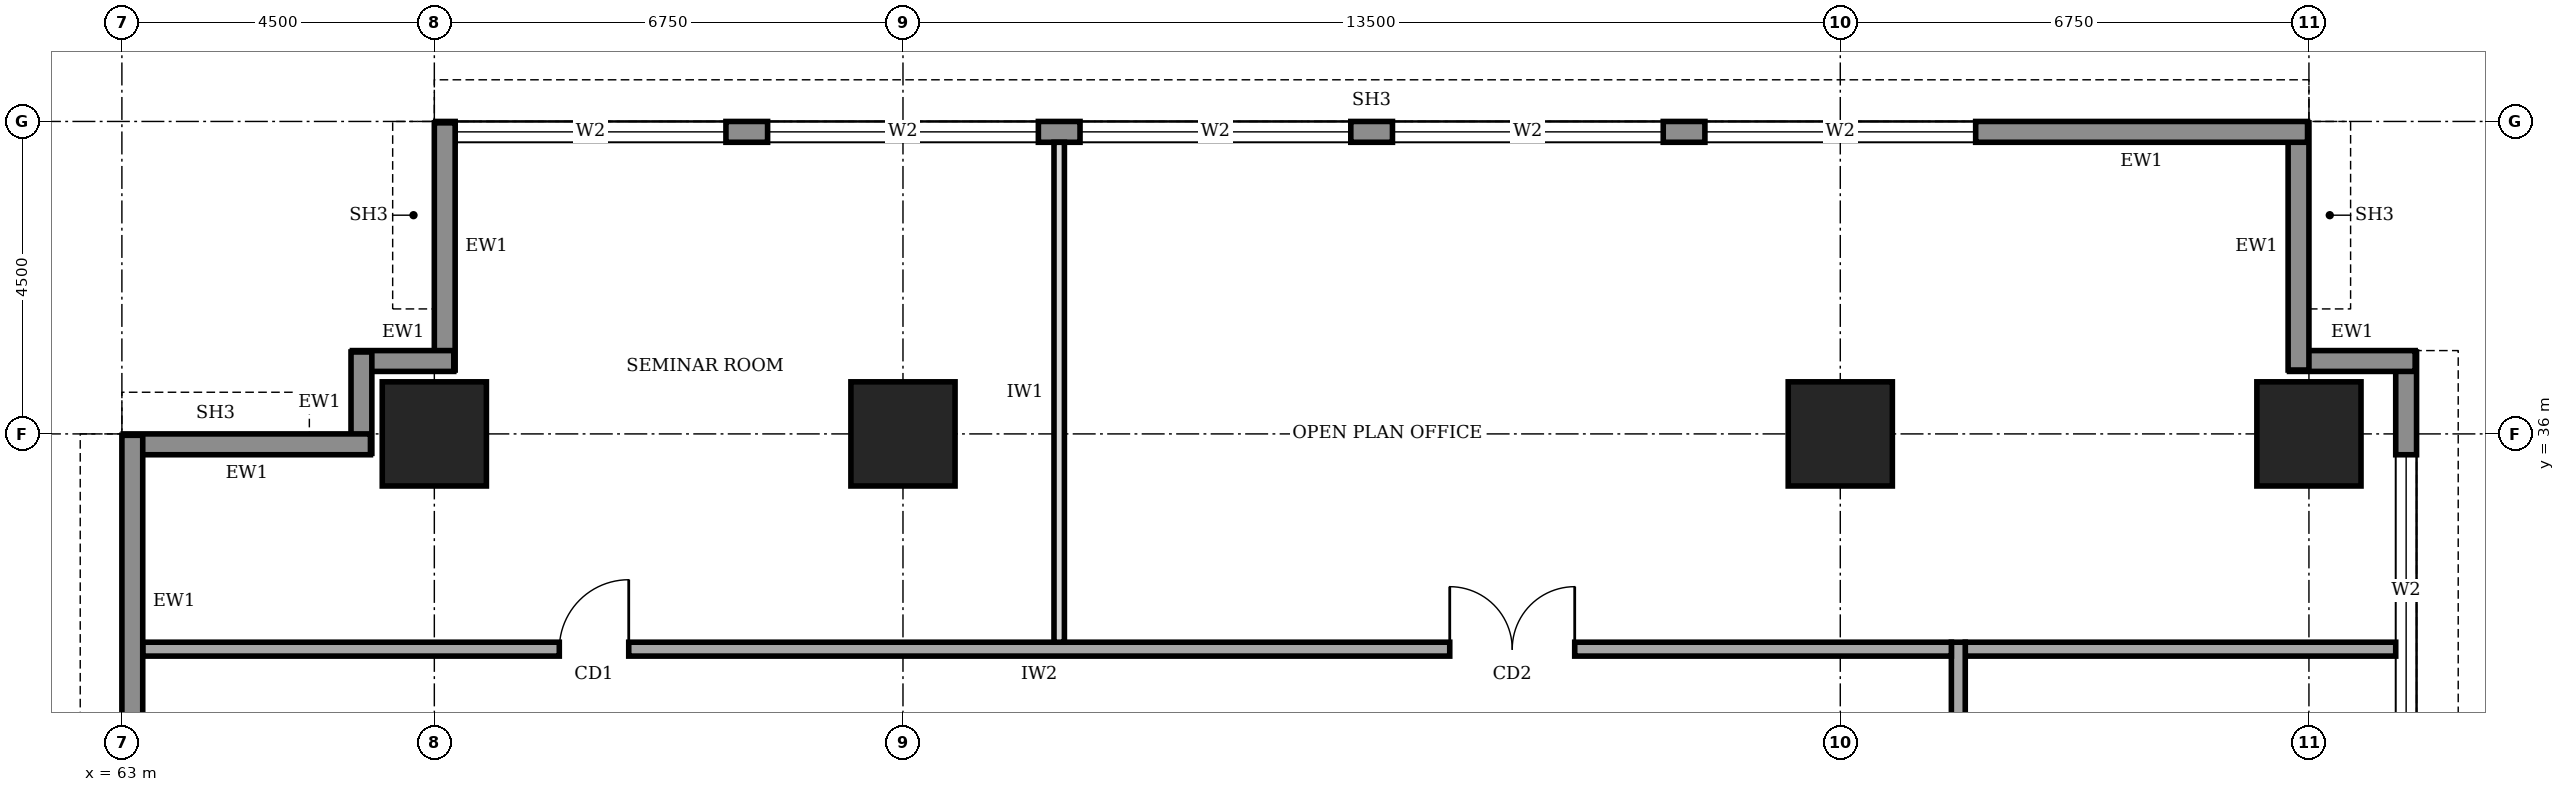
"""IFC4 building model, lengths in metres.
Left out: names, types, materials, properties, quantities, classifications, styles, units other than length and angle.
Written with IfcOpenShell. Run it as: python <this file> out.ifc"""

import sys

from ifc_helpers import new_model, si_unit, direction, frame, frame_2d, origin, origin_2d, place, context, subcontext, project, spatial, rectangle, extrude, element, fill, save


model = new_model("IFC4")
c1 = context("Model", 3, precision=1e-05, world=origin(), true_north=direction((0.0, 1.0)))
c2 = subcontext(c1, "Body", "Model", "MODEL_VIEW")
j1 = project(units=[si_unit("LENGTHUNIT", "METRE"), si_unit("PLANEANGLEUNIT", "RADIAN")], contexts=[c1])
p1 = place(None, origin())
s1 = spatial("IfcSite", under=j1, at=p1, CompositionType="ELEMENT")
p2 = place(p1, origin())
s2 = spatial("IfcBuilding", under=s1, at=p2, CompositionType="ELEMENT")
p3 = place(p2, frame((0.0, 0.0, 145.0)))
s3 = spatial("IfcBuildingStorey", under=s2, at=p3, CompositionType="ELEMENT", Elevation=145.0)
for number, where, z_axis, x_axis in (
    (1, (67.5, 36.0, 0.0), (0.0, 0.0, 1.0), (1.0, 0.0, 0.0)),
    (2, (74.25, 36.0, 0.0), (0.0, 0.0, 1.0), (1.0, 0.0, 0.0)),
    (3, (87.75, 36.0, 0.0), (0.0, 0.0, 1.0), (1.0, 0.0, 0.0)),
    (4, (94.5, 36.0, 0.0), (0.0, 0.0, 1.0), (1.0, 0.0, 0.0)),
):
    element("IfcColumn", number, at=place(p3, frame(where, z_axis=z_axis, x_axis=x_axis)), inside=s3, PredefinedType="COLUMN", context=c2, shape_type="SweptSolid", body=[
        extrude(rectangle(XDim=1.5, YDim=1.5, at=origin_2d()), origin(), (0.0, 0.0, 1.0), 4.0),
    ])
p4 = place(p3, frame((95.9, 3.32, 0.0), z_axis=(0.0, 0.0, 1.0), x_axis=(0.0, 1.0, 0.0)))
e5 = element("IfcWall", 5, at=p4, inside=s3, PredefinedType="STANDARD", context=c2, shape_type="SweptSolid", body=[
    extrude(rectangle(XDim=33.86, YDim=0.3, at=frame_2d((16.93, 0.0))), origin(), (0.0, 0.0, 1.0), 3.75),
])
p5 = place(p4, frame((1.48, 0.0, 0.6)))
e6 = element("IfcOpeningElement", 6, at=p5, cuts=e5, PredefinedType="OPENING", context=c2, shape_type="SweptSolid", body=[
    extrude(rectangle(XDim=3.9, YDim=2.6, at=frame_2d((1.95, 1.3))), frame((0.0, 0.16, 0.0), z_axis=(0.0, -1.0, 0.0), x_axis=(1.0, 0.0, 0.0)), (0.0, 0.0, 1.0), 0.32),
])
p6 = place(p4, frame((5.98, 0.0, 0.6)))
e7 = element("IfcOpeningElement", 7, at=p6, cuts=e5, PredefinedType="OPENING", context=c2, shape_type="SweptSolid", body=[
    extrude(rectangle(XDim=3.9, YDim=2.6, at=frame_2d((1.95, 1.3))), frame((0.0, 0.16, 0.0), z_axis=(0.0, -1.0, 0.0), x_axis=(1.0, 0.0, 0.0)), (0.0, 0.0, 1.0), 0.32),
])
p7 = place(p4, frame((10.48, 0.0, 0.6)))
e8 = element("IfcOpeningElement", 8, at=p7, cuts=e5, PredefinedType="OPENING", context=c2, shape_type="SweptSolid", body=[
    extrude(rectangle(XDim=3.9, YDim=2.6, at=frame_2d((1.95, 1.3))), frame((0.0, 0.16, 0.0), z_axis=(0.0, -1.0, 0.0), x_axis=(1.0, 0.0, 0.0)), (0.0, 0.0, 1.0), 0.32),
])
p8 = place(p4, frame((14.98, 0.0, 0.6)))
e9 = element("IfcOpeningElement", 9, at=p8, cuts=e5, PredefinedType="OPENING", context=c2, shape_type="SweptSolid", body=[
    extrude(rectangle(XDim=3.9, YDim=2.6, at=frame_2d((1.95, 1.3))), frame((0.0, 0.16, 0.0), z_axis=(0.0, -1.0, 0.0), x_axis=(1.0, 0.0, 0.0)), (0.0, 0.0, 1.0), 0.32),
])
p9 = place(p4, frame((19.48, 0.0, 0.6)))
e10 = element("IfcOpeningElement", 10, at=p9, cuts=e5, PredefinedType="OPENING", context=c2, shape_type="SweptSolid", body=[
    extrude(rectangle(XDim=3.9, YDim=2.6, at=frame_2d((1.95, 1.3))), frame((0.0, 0.16, 0.0), z_axis=(0.0, -1.0, 0.0), x_axis=(1.0, 0.0, 0.0)), (0.0, 0.0, 1.0), 0.32),
])
p10 = place(p4, frame((23.98, 0.0, 0.6)))
e11 = element("IfcOpeningElement", 11, at=p10, cuts=e5, PredefinedType="OPENING", context=c2, shape_type="SweptSolid", body=[
    extrude(rectangle(XDim=3.9, YDim=2.6, at=frame_2d((1.95, 1.3))), frame((0.0, 0.16, 0.0), z_axis=(0.0, -1.0, 0.0), x_axis=(1.0, 0.0, 0.0)), (0.0, 0.0, 1.0), 0.32),
])
p11 = place(p4, frame((28.48, 0.0, 0.6)))
e12 = element("IfcOpeningElement", 12, at=p11, cuts=e5, PredefinedType="OPENING", context=c2, shape_type="SweptSolid", body=[
    extrude(rectangle(XDim=3.9, YDim=2.6, at=frame_2d((1.95, 1.3))), frame((0.0, 0.16, 0.0), z_axis=(0.0, -1.0, 0.0), x_axis=(1.0, 0.0, 0.0)), (0.0, 0.0, 1.0), 0.32),
])
p12 = place(p3, frame((96.03, 37.05, 0.0), z_axis=(0.0, 0.0, 1.0), x_axis=(-1.0, 0.0, 0.0)))
e13 = element("IfcWall", 13, at=p12, inside=s3, PredefinedType="STANDARD", context=c2, shape_type="SweptSolid", body=[
    extrude(rectangle(XDim=1.81, YDim=0.3, at=frame_2d((0.905, 0.0))), origin(), (0.0, 0.0, 1.0), 3.75),
])
p13 = place(p3, frame((94.35, 36.92, 0.0), z_axis=(0.0, 0.0, 1.0), x_axis=(0.0, 1.0, 0.0)))
e14 = element("IfcWall", 14, at=p13, inside=s3, PredefinedType="STANDARD", context=c2, shape_type="SweptSolid", body=[
    extrude(rectangle(XDim=3.56, YDim=0.3, at=frame_2d((1.78, 0.0))), origin(), (0.0, 0.0, 1.0), 2.85),
])
p14 = place(p3, frame((94.48, 40.35, 0.0), z_axis=(0.0, 0.0, 1.0), x_axis=(-1.0, 0.0, 0.0)))
e15 = element("IfcWall", 15, at=p14, inside=s3, PredefinedType="STANDARD", context=c2, shape_type="SweptSolid", body=[
    extrude(rectangle(XDim=26.96, YDim=0.3, at=frame_2d((13.48, 0.0))), origin(), (0.0, 0.0, 1.0), 3.75),
])
p15 = place(p14, frame((22.78, 0.0, 0.6)))
e16 = element("IfcOpeningElement", 16, at=p15, cuts=e15, PredefinedType="OPENING", context=c2, shape_type="SweptSolid", body=[
    extrude(rectangle(XDim=3.9, YDim=2.6, at=frame_2d((1.95, 1.3))), frame((0.0, 0.16, 0.0), z_axis=(0.0, -1.0, 0.0), x_axis=(1.0, 0.0, 0.0)), (0.0, 0.0, 1.0), 0.32),
])
p16 = place(p14, frame((18.28, 0.0, 0.6)))
e17 = element("IfcOpeningElement", 17, at=p16, cuts=e15, PredefinedType="OPENING", context=c2, shape_type="SweptSolid", body=[
    extrude(rectangle(XDim=3.9, YDim=2.6, at=frame_2d((1.95, 1.3))), frame((0.0, 0.16, 0.0), z_axis=(0.0, -1.0, 0.0), x_axis=(1.0, 0.0, 0.0)), (0.0, 0.0, 1.0), 0.32),
])
p17 = place(p14, frame((13.78, 0.0, 0.6)))
e18 = element("IfcOpeningElement", 18, at=p17, cuts=e15, PredefinedType="OPENING", context=c2, shape_type="SweptSolid", body=[
    extrude(rectangle(XDim=3.9, YDim=2.6, at=frame_2d((1.95, 1.3))), frame((0.0, 0.16, 0.0), z_axis=(0.0, -1.0, 0.0), x_axis=(1.0, 0.0, 0.0)), (0.0, 0.0, 1.0), 0.32),
])
p18 = place(p14, frame((9.28, 0.0, 0.6)))
e19 = element("IfcOpeningElement", 19, at=p18, cuts=e15, PredefinedType="OPENING", context=c2, shape_type="SweptSolid", body=[
    extrude(rectangle(XDim=3.9, YDim=2.6, at=frame_2d((1.95, 1.3))), frame((0.0, 0.16, 0.0), z_axis=(0.0, -1.0, 0.0), x_axis=(1.0, 0.0, 0.0)), (0.0, 0.0, 1.0), 0.32),
])
p19 = place(p14, frame((4.78, 0.0, 0.6)))
e20 = element("IfcOpeningElement", 20, at=p19, cuts=e15, PredefinedType="OPENING", context=c2, shape_type="SweptSolid", body=[
    extrude(rectangle(XDim=3.9, YDim=2.6, at=frame_2d((1.95, 1.3))), frame((0.0, 0.16, 0.0), z_axis=(0.0, -1.0, 0.0), x_axis=(1.0, 0.0, 0.0)), (0.0, 0.0, 1.0), 0.32),
])
p20 = place(p3, frame((67.65, 40.48, 0.0), z_axis=(0.0, 0.0, 1.0), x_axis=(0.0, -1.0, 0.0)))
e21 = element("IfcWall", 21, at=p20, inside=s3, PredefinedType="STANDARD", context=c2, shape_type="SweptSolid", body=[
    extrude(rectangle(XDim=3.56, YDim=0.3, at=frame_2d((1.78, 0.0))), origin(), (0.0, 0.0, 1.0), 2.85),
])
for number, where, z_axis, x_axis in (
    (22, (67.78, 37.05, 0.0), (0.0, 0.0, 1.0), (-1.0, 0.0, 0.0)),
    (23, (66.45, 37.18, 0.0), (0.0, 0.0, 1.0), (0.0, -1.0, 0.0)),
):
    element("IfcWall", number, at=place(p3, frame(where, z_axis=z_axis, x_axis=x_axis)), inside=s3, PredefinedType="STANDARD", context=c2, shape_type="SweptSolid", body=[
        extrude(rectangle(XDim=1.46, YDim=0.3, at=frame_2d((0.73, 0.0))), origin(), (0.0, 0.0, 1.0), 3.75),
    ])
p21 = place(p3, frame((66.58, 35.85, 0.0), z_axis=(0.0, 0.0, 1.0), x_axis=(-1.0, 0.0, 0.0)))
e24 = element("IfcWall", 24, at=p21, inside=s3, PredefinedType="STANDARD", context=c2, shape_type="SweptSolid", body=[
    extrude(rectangle(XDim=3.56, YDim=0.3, at=frame_2d((1.78, 0.0))), origin(), (0.0, 0.0, 1.0), 2.85),
])
p22 = place(p3, frame((63.15, 35.98, 0.0), z_axis=(0.0, 0.0, 1.0), x_axis=(0.0, -1.0, 0.0)))
e25 = element("IfcWall", 25, at=p22, inside=s3, PredefinedType="STANDARD", context=c2, shape_type="SweptSolid", body=[
    extrude(rectangle(XDim=31.46, YDim=0.3, at=frame_2d((15.73, 0.0))), origin(), (0.0, 0.0, 1.0), 3.75),
])
p23 = place(p22, frame((27.28, 0.0, 0.6)))
e26 = element("IfcOpeningElement", 26, at=p23, cuts=e25, PredefinedType="OPENING", context=c2, shape_type="SweptSolid", body=[
    extrude(rectangle(XDim=3.9, YDim=2.6, at=frame_2d((1.95, 1.3))), frame((0.0, 0.16, 0.0), z_axis=(0.0, -1.0, 0.0), x_axis=(1.0, 0.0, 0.0)), (0.0, 0.0, 1.0), 0.32),
])
p24 = place(p22, frame((22.78, 0.0, 0.6)))
e27 = element("IfcOpeningElement", 27, at=p24, cuts=e25, PredefinedType="OPENING", context=c2, shape_type="SweptSolid", body=[
    extrude(rectangle(XDim=3.9, YDim=2.6, at=frame_2d((1.95, 1.3))), frame((0.0, 0.16, 0.0), z_axis=(0.0, -1.0, 0.0), x_axis=(1.0, 0.0, 0.0)), (0.0, 0.0, 1.0), 0.32),
])
p25 = place(p22, frame((18.28, 0.0, 0.6)))
e28 = element("IfcOpeningElement", 28, at=p25, cuts=e25, PredefinedType="OPENING", context=c2, shape_type="SweptSolid", body=[
    extrude(rectangle(XDim=3.9, YDim=2.6, at=frame_2d((1.95, 1.3))), frame((0.0, 0.16, 0.0), z_axis=(0.0, -1.0, 0.0), x_axis=(1.0, 0.0, 0.0)), (0.0, 0.0, 1.0), 0.32),
])
p26 = place(p22, frame((13.78, 0.0, 0.6)))
e29 = element("IfcOpeningElement", 29, at=p26, cuts=e25, PredefinedType="OPENING", context=c2, shape_type="SweptSolid", body=[
    extrude(rectangle(XDim=3.9, YDim=2.6, at=frame_2d((1.95, 1.3))), frame((0.0, 0.16, 0.0), z_axis=(0.0, -1.0, 0.0), x_axis=(1.0, 0.0, 0.0)), (0.0, 0.0, 1.0), 0.32),
])
p27 = place(p22, frame((9.28, 0.0, 0.6)))
e30 = element("IfcOpeningElement", 30, at=p27, cuts=e25, PredefinedType="OPENING", context=c2, shape_type="SweptSolid", body=[
    extrude(rectangle(XDim=3.9, YDim=2.6, at=frame_2d((1.95, 1.3))), frame((0.0, 0.16, 0.0), z_axis=(0.0, -1.0, 0.0), x_axis=(1.0, 0.0, 0.0)), (0.0, 0.0, 1.0), 0.32),
])
p28 = place(p22, frame((4.78, 0.0, 0.6)))
e31 = element("IfcOpeningElement", 31, at=p28, cuts=e25, PredefinedType="OPENING", context=c2, shape_type="SweptSolid", body=[
    extrude(rectangle(XDim=3.9, YDim=2.6, at=frame_2d((1.95, 1.3))), frame((0.0, 0.16, 0.0), z_axis=(0.0, -1.0, 0.0), x_axis=(1.0, 0.0, 0.0)), (0.0, 0.0, 1.0), 0.32),
])
p29 = place(p3, frame((89.45, 9.2, 0.0), z_axis=(0.0, 0.0, 1.0), x_axis=(0.0, 1.0, 0.0)))
e32 = element("IfcWall", 32, at=p29, inside=s3, PredefinedType="SOLIDWALL", context=c2, shape_type="SweptSolid", body=[
    extrude(rectangle(XDim=23.8, YDim=0.2, at=frame_2d((11.9, 0.0))), origin(), (0.0, 0.0, 1.0), 3.75),
])
p30 = place(p29, frame((1.55, 0.0, 0.0)))
e33 = element("IfcOpeningElement", 33, at=p30, cuts=e32, PredefinedType="OPENING", context=c2, shape_type="SweptSolid", body=[
    extrude(rectangle(XDim=1.0, YDim=2.1, at=frame_2d((0.5, 1.05))), frame((0.0, 0.11, 0.0), z_axis=(0.0, -1.0, 0.0), x_axis=(1.0, 0.0, 0.0)), (0.0, 0.0, 1.0), 0.22),
])
p31 = place(p29, frame((5.55, 0.0, 0.0)))
e34 = element("IfcOpeningElement", 34, at=p31, cuts=e32, PredefinedType="OPENING", context=c2, shape_type="SweptSolid", body=[
    extrude(rectangle(XDim=0.9, YDim=2.1, at=frame_2d((0.45, 1.05))), frame((0.0, 0.11, 0.0), z_axis=(0.0, -1.0, 0.0), x_axis=(1.0, 0.0, 0.0)), (0.0, 0.0, 1.0), 0.22),
])
p32 = place(p29, frame((10.35, 0.0, 0.0)))
e35 = element("IfcOpeningElement", 35, at=p32, cuts=e32, PredefinedType="OPENING", context=c2, shape_type="SweptSolid", body=[
    extrude(rectangle(XDim=0.9, YDim=2.1, at=frame_2d((0.45, 1.05))), frame((0.0, 0.11, 0.0), z_axis=(0.0, -1.0, 0.0), x_axis=(1.0, 0.0, 0.0)), (0.0, 0.0, 1.0), 0.22),
])
p33 = place(p29, frame((13.4, 0.0, 0.0)))
e36 = element("IfcOpeningElement", 36, at=p33, cuts=e32, PredefinedType="OPENING", context=c2, shape_type="SweptSolid", body=[
    extrude(rectangle(XDim=0.9, YDim=2.1, at=frame_2d((0.45, 1.05))), frame((0.0, 0.11, 0.0), z_axis=(0.0, -1.0, 0.0), x_axis=(1.0, 0.0, 0.0)), (0.0, 0.0, 1.0), 0.22),
])
p34 = place(p29, frame((16.3, 0.0, 0.0)))
e37 = element("IfcOpeningElement", 37, at=p34, cuts=e32, PredefinedType="OPENING", context=c2, shape_type="SweptSolid", body=[
    extrude(rectangle(XDim=1.0, YDim=2.1, at=frame_2d((0.5, 1.05))), frame((0.0, 0.11, 0.0), z_axis=(0.0, -1.0, 0.0), x_axis=(1.0, 0.0, 0.0)), (0.0, 0.0, 1.0), 0.22),
])
p35 = place(p29, frame((8.2, 0.0, 0.0)))
e38 = element("IfcOpeningElement", 38, at=p35, cuts=e32, PredefinedType="OPENING", context=c2, shape_type="SweptSolid", body=[
    extrude(rectangle(XDim=1.0, YDim=2.1, at=frame_2d((0.5, 1.05))), frame((0.0, 0.11, 0.0), z_axis=(0.0, -1.0, 0.0), x_axis=(1.0, 0.0, 0.0)), (0.0, 0.0, 1.0), 0.22),
])
p36 = place(p29, frame((20.3, 0.0, 0.0)))
e39 = element("IfcOpeningElement", 39, at=p36, cuts=e32, PredefinedType="OPENING", context=c2, shape_type="SweptSolid", body=[
    extrude(rectangle(XDim=1.0, YDim=2.1, at=frame_2d((0.5, 1.05))), frame((0.0, 0.11, 0.0), z_axis=(0.0, -1.0, 0.0), x_axis=(1.0, 0.0, 0.0)), (0.0, 0.0, 1.0), 0.22),
])
p37 = place(p3, frame((89.35, 32.9, 0.0), z_axis=(0.0, 0.0, 1.0), x_axis=(-1.0, 0.0, 0.0)))
e40 = element("IfcWall", 40, at=p37, inside=s3, PredefinedType="SOLIDWALL", context=c2, shape_type="SweptSolid", body=[
    extrude(rectangle(XDim=26.05, YDim=0.2, at=frame_2d((13.025, 0.0))), origin(), (0.0, 0.0, 1.0), 3.75),
])
p38 = place(p37, frame((19.05, 0.0, 0.0)))
e41 = element("IfcOpeningElement", 41, at=p38, cuts=e40, PredefinedType="OPENING", context=c2, shape_type="SweptSolid", body=[
    extrude(rectangle(XDim=1.0, YDim=2.1, at=frame_2d((0.5, 1.05))), frame((0.0, 0.11, 0.0), z_axis=(0.0, -1.0, 0.0), x_axis=(1.0, 0.0, 0.0)), (0.0, 0.0, 1.0), 0.22),
])
p39 = place(p37, frame((5.425, 0.0, 0.0)))
e42 = element("IfcOpeningElement", 42, at=p39, cuts=e40, PredefinedType="OPENING", context=c2, shape_type="SweptSolid", body=[
    extrude(rectangle(XDim=1.8, YDim=2.1, at=frame_2d((0.9, 1.05))), frame((0.0, 0.11, 0.0), z_axis=(0.0, -1.0, 0.0), x_axis=(1.0, 0.0, 0.0)), (0.0, 0.0, 1.0), 0.22),
])
p40 = place(p3, frame((89.55, 32.9, 0.0), z_axis=(0.0, 0.0, 1.0), x_axis=(1.0, 0.0, 0.0)))
e43 = element("IfcWall", 43, at=p40, inside=s3, PredefinedType="SOLIDWALL", context=c2, shape_type="SweptSolid", body=[
    extrude(rectangle(XDim=6.2, YDim=0.2, at=frame_2d((3.1, 0.0))), origin(), (0.0, 0.0, 1.0), 3.75),
])
p41 = place(p3, frame((76.5, 33.0, 0.0), z_axis=(0.0, 0.0, 1.0), x_axis=(0.0, 1.0, 0.0)))
e44 = element("IfcWall", 44, at=p41, inside=s3, PredefinedType="PARTITIONING", context=c2, shape_type="SweptSolid", body=[
    extrude(rectangle(XDim=7.2, YDim=0.15, at=frame_2d((3.6, 0.0))), origin(), (0.0, 0.0, 1.0), 3.75),
])
p42 = place(p11, origin())
e45 = element("IfcWindow", 45, at=p42, inside=s3, PartitioningType="SINGLE_PANEL", PredefinedType="WINDOW", context=c2, shape_type="SweptSolid", body=[
    extrude(rectangle(XDim=3.9, YDim=2.6, at=frame_2d((1.95, 1.3))), frame((0.0, 0.03, 0.0), z_axis=(0.0, -1.0, 0.0), x_axis=(1.0, 0.0, 0.0)), (0.0, 0.0, 1.0), 0.06),
])
fill(e12, e45)
p43 = place(p15, origin())
e46 = element("IfcWindow", 46, at=p43, inside=s3, PartitioningType="SINGLE_PANEL", PredefinedType="WINDOW", context=c2, shape_type="SweptSolid", body=[
    extrude(rectangle(XDim=3.9, YDim=2.6, at=frame_2d((1.95, 1.3))), frame((0.0, 0.03, 0.0), z_axis=(0.0, -1.0, 0.0), x_axis=(1.0, 0.0, 0.0)), (0.0, 0.0, 1.0), 0.06),
])
fill(e16, e46)
p44 = place(p16, origin())
e47 = element("IfcWindow", 47, at=p44, inside=s3, PartitioningType="SINGLE_PANEL", PredefinedType="WINDOW", context=c2, shape_type="SweptSolid", body=[
    extrude(rectangle(XDim=3.9, YDim=2.6, at=frame_2d((1.95, 1.3))), frame((0.0, 0.03, 0.0), z_axis=(0.0, -1.0, 0.0), x_axis=(1.0, 0.0, 0.0)), (0.0, 0.0, 1.0), 0.06),
])
fill(e17, e47)
p45 = place(p17, origin())
e48 = element("IfcWindow", 48, at=p45, inside=s3, PartitioningType="SINGLE_PANEL", PredefinedType="WINDOW", context=c2, shape_type="SweptSolid", body=[
    extrude(rectangle(XDim=3.9, YDim=2.6, at=frame_2d((1.95, 1.3))), frame((0.0, 0.03, 0.0), z_axis=(0.0, -1.0, 0.0), x_axis=(1.0, 0.0, 0.0)), (0.0, 0.0, 1.0), 0.06),
])
fill(e18, e48)
p46 = place(p18, origin())
e49 = element("IfcWindow", 49, at=p46, inside=s3, PartitioningType="SINGLE_PANEL", PredefinedType="WINDOW", context=c2, shape_type="SweptSolid", body=[
    extrude(rectangle(XDim=3.9, YDim=2.6, at=frame_2d((1.95, 1.3))), frame((0.0, 0.03, 0.0), z_axis=(0.0, -1.0, 0.0), x_axis=(1.0, 0.0, 0.0)), (0.0, 0.0, 1.0), 0.06),
])
fill(e19, e49)
p47 = place(p19, origin())
e50 = element("IfcWindow", 50, at=p47, inside=s3, PartitioningType="SINGLE_PANEL", PredefinedType="WINDOW", context=c2, shape_type="SweptSolid", body=[
    extrude(rectangle(XDim=3.9, YDim=2.6, at=frame_2d((1.95, 1.3))), frame((0.0, 0.03, 0.0), z_axis=(0.0, -1.0, 0.0), x_axis=(1.0, 0.0, 0.0)), (0.0, 0.0, 1.0), 0.06),
])
fill(e20, e50)
p48 = place(p38, frame((1.0, 0.0, 0.0), z_axis=(0.0, 0.0, 1.0), x_axis=(-1.0, 0.0, 0.0)))
e51 = element("IfcDoor", 51, at=p48, inside=s3, OperationType="SINGLE_SWING_RIGHT", PredefinedType="DOOR", context=c2, shape_type="SweptSolid", body=[
    extrude(rectangle(XDim=1.0, YDim=2.1, at=frame_2d((0.5, 1.05))), frame((0.0, 0.025, 0.0), z_axis=(0.0, -1.0, 0.0), x_axis=(1.0, 0.0, 0.0)), (0.0, 0.0, 1.0), 0.05),
])
fill(e41, e51)
p49 = place(p39, frame((1.8, 0.0, 0.0), z_axis=(0.0, 0.0, 1.0), x_axis=(-1.0, 0.0, 0.0)))
e52 = element("IfcDoor", 52, at=p49, inside=s3, OperationType="DOUBLE_DOOR_SINGLE_SWING", PredefinedType="DOOR", context=c2, shape_type="SweptSolid", body=[
    extrude(rectangle(XDim=1.8, YDim=2.1, at=frame_2d((0.9, 1.05))), frame((0.0, 0.025, 0.0), z_axis=(0.0, -1.0, 0.0), x_axis=(1.0, 0.0, 0.0)), (0.0, 0.0, 1.0), 0.05),
])
fill(e42, e52)
save(model, sys.argv[1])
